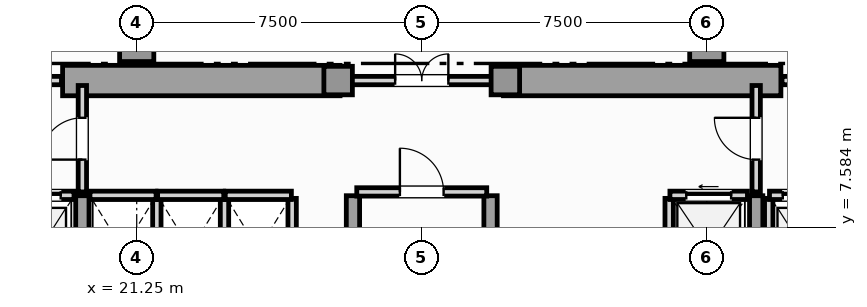
"""IFC4 building model, lengths in metres.
Left out: names, types, materials, properties, quantities, classifications, styles, units other than length and angle.
Written with IfcOpenShell. Run it as: python <this file> out.ifc"""

import sys

from ifc_helpers import new_model, si_unit, direction, frame, frame_2d, origin, origin_2d, place, context, subcontext, project, spatial, rectangle, extrude, element, fill, save


model = new_model("IFC4")
c1 = context("Model", 3, precision=1e-05, world=origin(), true_north=direction((0.0, 1.0)))
c2 = subcontext(c1, "Body", "Model", "MODEL_VIEW")
j1 = project(units=[si_unit("LENGTHUNIT", "METRE"), si_unit("PLANEANGLEUNIT", "RADIAN")], contexts=[c1])
p1 = place(None, origin())
s1 = spatial("IfcSite", under=j1, at=p1, CompositionType="ELEMENT")
p2 = place(p1, origin())
s2 = spatial("IfcBuilding", under=s1, at=p2, CompositionType="ELEMENT")
p3 = place(p2, frame((0.0, 0.0, 5.4)))
s3 = spatial("IfcBuildingStorey", under=s2, at=p3, CompositionType="ELEMENT", Elevation=5.4)
for number, where, z_axis, x_axis in (
    (1, (19.3, 11.45, 0.0), (0.0, 0.0, 1.0), (1.0, 0.0, 0.0)),
    (2, (30.9, 11.45, 0.0), (0.0, 0.0, 1.0), (1.0, 0.0, 0.0)),
):
    element("IfcWall", number, at=place(p3, frame(where, z_axis=z_axis, x_axis=x_axis)), inside=s3, PredefinedType="SHEAR", context=c2, shape_type="SweptSolid", body=[
        extrude(rectangle(XDim=7.3, YDim=0.8, at=frame_2d((3.65, 0.0))), origin(), (0.0, 0.0, 1.0), 4.5),
    ])
for number, where, z_axis, x_axis in (
    (3, (19.82, 0.92, 0.0), (0.0, 0.0, 1.0), (0.0, 1.0, 0.0)),
    (4, (26.94, 0.92, 0.0), (0.0, 0.0, 1.0), (0.0, 1.0, 0.0)),
    (5, (30.56, 0.92, 0.0), (0.0, 0.0, 1.0), (0.0, 1.0, 0.0)),
    (6, (37.55, 0.92, 0.0), (0.0, 0.0, 1.0), (0.0, 1.0, 0.0)),
):
    element("IfcWall", number, at=place(p3, frame(where, z_axis=z_axis, x_axis=x_axis)), inside=s3, PredefinedType="SHEAR", context=c2, shape_type="SweptSolid", body=[
        extrude(rectangle(XDim=7.5, YDim=0.35, at=frame_2d((3.75, 0.0))), origin(), (0.0, 0.0, 1.0), 4.5),
    ])
for number, where, z_axis, x_axis in (
    (7, (26.55, 11.45, 0.0), (0.0, 0.0, 1.0), (1.0, 0.0, 0.0)),
    (8, (30.95, 11.45, 0.0), (0.0, 0.0, 1.0), (1.0, 0.0, 0.0)),
):
    element("IfcColumn", number, at=place(p3, frame(where, z_axis=z_axis, x_axis=x_axis)), inside=s3, PredefinedType="COLUMN", context=c2, shape_type="SweptSolid", body=[
        extrude(rectangle(XDim=0.75, YDim=0.75, at=origin_2d()), origin(), (0.0, 0.0, 1.0), 4.8),
    ])
for number, where, z_axis, x_axis in (
    (9, (21.25, 12.4, 0.0), (0.0, 0.0, 1.0), (1.0, 0.0, 0.0)),
    (10, (36.25, 12.4, 0.0), (0.0, 0.0, 1.0), (1.0, 0.0, 0.0)),
):
    element("IfcColumn", number, at=place(p3, frame(where, z_axis=z_axis, x_axis=x_axis)), inside=s3, PredefinedType="COLUMN", context=c2, shape_type="SweptSolid", body=[
        extrude(rectangle(XDim=0.9, YDim=0.9, at=origin_2d()), origin(), (0.0, 0.0, 1.0), 4.8),
    ])
p4 = place(p3, frame((17.78, 8.43, 0.0), z_axis=(0.0, 0.0, 1.0), x_axis=(1.0, 0.0, 0.0)))
e11 = element("IfcWall", 11, at=p4, inside=s3, PredefinedType="SOLIDWALL", context=c2, shape_type="SweptSolid", body=[
    extrude(rectangle(XDim=1.82, YDim=0.22, at=frame_2d((0.91, 0.0))), origin(), (0.0, 0.0, 1.0), 4.5),
])
p5 = place(p4, frame((0.35, 0.0, 0.0)))
e12 = element("IfcOpeningElement", 12, at=p5, cuts=e11, PredefinedType="OPENING", context=c2, shape_type="SweptSolid", body=[
    extrude(rectangle(XDim=1.12, YDim=2.25, at=frame_2d((0.56, 1.125))), frame((0.0, 0.12, 0.0), z_axis=(0.0, -1.0, 0.0), x_axis=(1.0, 0.0, 0.0)), (0.0, 0.0, 1.0), 0.24),
])
p6 = place(p3, frame((37.88, 5.65, 0.0), z_axis=(0.0, 0.0, 1.0), x_axis=(0.0, 1.0, 0.0)))
e13 = element("IfcWall", 13, at=p6, inside=s3, PredefinedType="SOLIDWALL", context=c2, shape_type="SweptSolid", body=[
    extrude(rectangle(XDim=2.7, YDim=0.22, at=frame_2d((1.35, 0.0))), origin(), (0.0, 0.0, 1.0), 4.5),
])
p7 = place(p3, frame((37.9, 8.43, 0.0), z_axis=(0.0, 0.0, 1.0), x_axis=(1.0, 0.0, 0.0)))
e14 = element("IfcWall", 14, at=p7, inside=s3, PredefinedType="SOLIDWALL", context=c2, shape_type="SweptSolid", body=[
    extrude(rectangle(XDim=1.82, YDim=0.22, at=frame_2d((0.91, 0.0))), origin(), (0.0, 0.0, 1.0), 4.5),
])
p8 = place(p7, frame((0.35, 0.0, 0.0)))
e15 = element("IfcOpeningElement", 15, at=p8, cuts=e14, PredefinedType="OPENING", context=c2, shape_type="SweptSolid", body=[
    extrude(rectangle(XDim=1.12, YDim=2.25, at=frame_2d((0.56, 1.125))), frame((0.0, 0.12, 0.0), z_axis=(0.0, -1.0, 0.0), x_axis=(1.0, 0.0, 0.0)), (0.0, 0.0, 1.0), 0.24),
])
p9 = place(p3, frame((35.26, 5.65, 0.0), z_axis=(0.0, 0.0, 1.0), x_axis=(0.0, 1.0, 0.0)))
e16 = element("IfcWall", 16, at=p9, inside=s3, PredefinedType="SOLIDWALL", context=c2, shape_type="SweptSolid", body=[
    extrude(rectangle(XDim=2.7, YDim=0.22, at=frame_2d((1.35, 0.0))), origin(), (0.0, 0.0, 1.0), 4.5),
])
p10 = place(p3, frame((35.28, 8.43, 0.0), z_axis=(0.0, 0.0, 1.0), x_axis=(1.0, 0.0, 0.0)))
e17 = element("IfcWall", 17, at=p10, inside=s3, PredefinedType="SOLIDWALL", context=c2, shape_type="SweptSolid", body=[
    extrude(rectangle(XDim=2.04, YDim=0.22, at=frame_2d((1.02, 0.0))), origin(), (0.0, 0.0, 1.0), 4.5),
])
p11 = place(p10, frame((0.43, 0.0, 0.0)))
e18 = element("IfcOpeningElement", 18, at=p11, cuts=e17, PredefinedType="OPENING", context=c2, shape_type="SweptSolid", body=[
    extrude(rectangle(XDim=1.18, YDim=2.2, at=frame_2d((0.59, 1.1))), frame((0.0, 0.12, 0.0), z_axis=(0.0, -1.0, 0.0), x_axis=(1.0, 0.0, 0.0)), (0.0, 0.0, 1.0), 0.24),
])
p12 = place(p3, frame((21.78, 5.65, 0.0), z_axis=(0.0, 0.0, 1.0), x_axis=(0.0, 1.0, 0.0)))
e19 = element("IfcWall", 19, at=p12, inside=s3, PredefinedType="SOLIDWALL", context=c2, shape_type="SweptSolid", body=[
    extrude(rectangle(XDim=2.7, YDim=0.22, at=frame_2d((1.35, 0.0))), origin(), (0.0, 0.0, 1.0), 4.5),
])
p13 = place(p3, frame((20.02, 8.43, 0.0), z_axis=(0.0, 0.0, 1.0), x_axis=(1.0, 0.0, 0.0)))
e20 = element("IfcWall", 20, at=p13, inside=s3, PredefinedType="SOLIDWALL", context=c2, shape_type="SweptSolid", body=[
    extrude(rectangle(XDim=1.74, YDim=0.22, at=frame_2d((0.87, 0.0))), origin(), (0.0, 0.0, 1.0), 4.5),
])
p14 = place(p3, frame((23.56, 5.65, 0.0), z_axis=(0.0, 0.0, 1.0), x_axis=(0.0, 1.0, 0.0)))
e21 = element("IfcWall", 21, at=p14, inside=s3, PredefinedType="SOLIDWALL", context=c2, shape_type="SweptSolid", body=[
    extrude(rectangle(XDim=2.7, YDim=0.22, at=frame_2d((1.35, 0.0))), origin(), (0.0, 0.0, 1.0), 4.5),
])
p15 = place(p3, frame((21.8, 8.43, 0.0), z_axis=(0.0, 0.0, 1.0), x_axis=(1.0, 0.0, 0.0)))
e22 = element("IfcWall", 22, at=p15, inside=s3, PredefinedType="SOLIDWALL", context=c2, shape_type="SweptSolid", body=[
    extrude(rectangle(XDim=1.74, YDim=0.22, at=frame_2d((0.87, 0.0))), origin(), (0.0, 0.0, 1.0), 4.5),
])
p16 = place(p3, frame((25.34, 5.65, 0.0), z_axis=(0.0, 0.0, 1.0), x_axis=(0.0, 1.0, 0.0)))
e23 = element("IfcWall", 23, at=p16, inside=s3, PredefinedType="SOLIDWALL", context=c2, shape_type="SweptSolid", body=[
    extrude(rectangle(XDim=2.7, YDim=0.22, at=frame_2d((1.35, 0.0))), origin(), (0.0, 0.0, 1.0), 4.5),
])
p17 = place(p3, frame((23.58, 8.43, 0.0), z_axis=(0.0, 0.0, 1.0), x_axis=(1.0, 0.0, 0.0)))
e24 = element("IfcWall", 24, at=p17, inside=s3, PredefinedType="SOLIDWALL", context=c2, shape_type="SweptSolid", body=[
    extrude(rectangle(XDim=1.74, YDim=0.22, at=frame_2d((0.87, 0.0))), origin(), (0.0, 0.0, 1.0), 4.5),
])
p18 = place(p3, frame((27.04, 8.52, 0.0), z_axis=(0.0, 0.0, 1.0), x_axis=(1.0, 0.0, 0.0)))
e25 = element("IfcWall", 25, at=p18, inside=s3, PredefinedType="SOLIDWALL", context=c2, shape_type="SweptSolid", body=[
    extrude(rectangle(XDim=3.42, YDim=0.22, at=frame_2d((1.71, 0.0))), origin(), (0.0, 0.0, 1.0), 4.5),
])
p19 = place(p18, frame((1.135, 0.0, 0.0)))
e26 = element("IfcOpeningElement", 26, at=p19, cuts=e25, PredefinedType="OPENING", context=c2, shape_type="SweptSolid", body=[
    extrude(rectangle(XDim=1.15, YDim=2.2, at=frame_2d((0.575, 1.1))), frame((0.0, 0.12, 0.0), z_axis=(0.0, -1.0, 0.0), x_axis=(1.0, 0.0, 0.0)), (0.0, 0.0, 1.0), 0.24),
])
p20 = place(p3, frame((19.82, 8.52, 0.0), z_axis=(0.0, 0.0, 1.0), x_axis=(0.0, 1.0, 0.0)))
e27 = element("IfcWall", 27, at=p20, inside=s3, PredefinedType="SOLIDWALL", context=c2, shape_type="SweptSolid", body=[
    extrude(rectangle(XDim=2.8, YDim=0.22, at=frame_2d((1.4, 0.0))), origin(), (0.0, 0.0, 1.0), 3.956),
])
p21 = place(p20, frame((0.85, 0.0, 0.0)))
e28 = element("IfcOpeningElement", 28, at=p21, cuts=e27, PredefinedType="OPENING", context=c2, shape_type="SweptSolid", body=[
    extrude(rectangle(XDim=1.1, YDim=2.2, at=frame_2d((0.55, 1.1))), frame((0.0, 0.12, 0.0), z_axis=(0.0, -1.0, 0.0), x_axis=(1.0, 0.0, 0.0)), (0.0, 0.0, 1.0), 0.24),
])
p22 = place(p3, frame((37.55, 8.52, 0.0), z_axis=(0.0, 0.0, 1.0), x_axis=(0.0, 1.0, 0.0)))
e29 = element("IfcWall", 29, at=p22, inside=s3, PredefinedType="SOLIDWALL", context=c2, shape_type="SweptSolid", body=[
    extrude(rectangle(XDim=2.8, YDim=0.22, at=frame_2d((1.4, 0.0))), origin(), (0.0, 0.0, 1.0), 3.956),
])
p23 = place(p22, frame((0.85, 0.0, 0.0)))
e30 = element("IfcOpeningElement", 30, at=p23, cuts=e29, PredefinedType="OPENING", context=c2, shape_type="SweptSolid", body=[
    extrude(rectangle(XDim=1.1, YDim=2.2, at=frame_2d((0.55, 1.1))), frame((0.0, 0.12, 0.0), z_axis=(0.0, -1.0, 0.0), x_axis=(1.0, 0.0, 0.0)), (0.0, 0.0, 1.0), 0.24),
])
p24 = place(p3, frame((16.23, 11.45, 0.0), z_axis=(0.0, 0.0, 1.0), x_axis=(1.0, 0.0, 0.0)))
e31 = element("IfcWall", 31, at=p24, inside=s3, PredefinedType="SOLIDWALL", context=c2, shape_type="SweptSolid", body=[
    extrude(rectangle(XDim=3.04, YDim=0.22, at=frame_2d((1.52, 0.0))), origin(), (0.0, 0.0, 1.0), 4.5),
])
p25 = place(p24, frame((0.97, 0.0, 0.0)))
e32 = element("IfcOpeningElement", 32, at=p25, cuts=e31, PredefinedType="OPENING", context=c2, shape_type="SweptSolid", body=[
    extrude(rectangle(XDim=1.1, YDim=2.2, at=frame_2d((0.55, 1.1))), frame((0.0, 0.12, 0.0), z_axis=(0.0, -1.0, 0.0), x_axis=(1.0, 0.0, 0.0)), (0.0, 0.0, 1.0), 0.24),
])
p26 = place(p3, frame((26.63, 11.45, 0.0), z_axis=(0.0, 0.0, 1.0), x_axis=(1.0, 0.0, 0.0)))
e33 = element("IfcWall", 33, at=p26, inside=s3, PredefinedType="SOLIDWALL", context=c2, shape_type="SweptSolid", body=[
    extrude(rectangle(XDim=4.24, YDim=0.22, at=frame_2d((2.12, 0.0))), origin(), (0.0, 0.0, 1.0), 4.5),
])
p27 = place(p26, frame((1.42, 0.0, 0.0)))
e34 = element("IfcOpeningElement", 34, at=p27, cuts=e33, PredefinedType="OPENING", context=c2, shape_type="SweptSolid", body=[
    extrude(rectangle(XDim=1.4, YDim=2.2, at=frame_2d((0.7, 1.1))), frame((0.0, 0.12, 0.0), z_axis=(0.0, -1.0, 0.0), x_axis=(1.0, 0.0, 0.0)), (0.0, 0.0, 1.0), 0.24),
])
p28 = place(p3, frame((38.23, 11.45, 0.0), z_axis=(0.0, 0.0, 1.0), x_axis=(1.0, 0.0, 0.0)))
e35 = element("IfcWall", 35, at=p28, inside=s3, PredefinedType="SOLIDWALL", context=c2, shape_type="SweptSolid", body=[
    extrude(rectangle(XDim=3.04, YDim=0.22, at=frame_2d((1.52, 0.0))), origin(), (0.0, 0.0, 1.0), 4.5),
])
p29 = place(p28, frame((0.97, 0.0, 0.0)))
e36 = element("IfcOpeningElement", 36, at=p29, cuts=e35, PredefinedType="OPENING", context=c2, shape_type="SweptSolid", body=[
    extrude(rectangle(XDim=1.1, YDim=2.2, at=frame_2d((0.55, 1.1))), frame((0.0, 0.12, 0.0), z_axis=(0.0, -1.0, 0.0), x_axis=(1.0, 0.0, 0.0)), (0.0, 0.0, 1.0), 0.24),
])
p30 = place(p5, origin())
e37 = element("IfcDoor", 37, at=p30, inside=s3, OperationType="SLIDING_TO_LEFT", PredefinedType="DOOR", context=c2, shape_type="SweptSolid", body=[
    extrude(rectangle(XDim=1.12, YDim=2.25, at=frame_2d((0.56, 1.125))), frame((0.0, 0.025, 0.0), z_axis=(0.0, -1.0, 0.0), x_axis=(1.0, 0.0, 0.0)), (0.0, 0.0, 1.0), 0.05),
])
fill(e12, e37)
p31 = place(p8, origin())
e38 = element("IfcDoor", 38, at=p31, inside=s3, OperationType="SLIDING_TO_RIGHT", PredefinedType="DOOR", context=c2, shape_type="SweptSolid", body=[
    extrude(rectangle(XDim=1.12, YDim=2.25, at=frame_2d((0.56, 1.125))), frame((0.0, 0.025, 0.0), z_axis=(0.0, -1.0, 0.0), x_axis=(1.0, 0.0, 0.0)), (0.0, 0.0, 1.0), 0.05),
])
fill(e15, e38)
p32 = place(p11, origin())
e39 = element("IfcDoor", 39, at=p32, inside=s3, OperationType="SLIDING_TO_LEFT", PredefinedType="DOOR", context=c2, shape_type="SweptSolid", body=[
    extrude(rectangle(XDim=1.18, YDim=2.2, at=frame_2d((0.59, 1.1))), frame((0.0, 0.025, 0.0), z_axis=(0.0, -1.0, 0.0), x_axis=(1.0, 0.0, 0.0)), (0.0, 0.0, 1.0), 0.05),
])
fill(e18, e39)
p33 = place(p19, origin())
e40 = element("IfcDoor", 40, at=p33, inside=s3, OperationType="SINGLE_SWING_LEFT", PredefinedType="DOOR", context=c2, shape_type="SweptSolid", body=[
    extrude(rectangle(XDim=1.15, YDim=2.2, at=frame_2d((0.575, 1.1))), frame((0.0, 0.025, 0.0), z_axis=(0.0, -1.0, 0.0), x_axis=(1.0, 0.0, 0.0)), (0.0, 0.0, 1.0), 0.05),
])
fill(e26, e40)
p34 = place(p21, origin())
e41 = element("IfcDoor", 41, at=p34, inside=s3, OperationType="SINGLE_SWING_LEFT", PredefinedType="DOOR", context=c2, shape_type="SweptSolid", body=[
    extrude(rectangle(XDim=1.1, YDim=2.2, at=frame_2d((0.55, 1.1))), frame((0.0, 0.025, 0.0), z_axis=(0.0, -1.0, 0.0), x_axis=(1.0, 0.0, 0.0)), (0.0, 0.0, 1.0), 0.05),
])
fill(e28, e41)
p35 = place(p23, origin())
e42 = element("IfcDoor", 42, at=p35, inside=s3, OperationType="SINGLE_SWING_RIGHT", PredefinedType="DOOR", context=c2, shape_type="SweptSolid", body=[
    extrude(rectangle(XDim=1.1, YDim=2.2, at=frame_2d((0.55, 1.1))), frame((0.0, 0.025, 0.0), z_axis=(0.0, -1.0, 0.0), x_axis=(1.0, 0.0, 0.0)), (0.0, 0.0, 1.0), 0.05),
])
fill(e30, e42)
p36 = place(p27, origin())
e43 = element("IfcDoor", 43, at=p36, inside=s3, OperationType="DOUBLE_DOOR_SINGLE_SWING", PredefinedType="DOOR", context=c2, shape_type="SweptSolid", body=[
    extrude(rectangle(XDim=1.4, YDim=2.2, at=frame_2d((0.7, 1.1))), frame((0.0, 0.025, 0.0), z_axis=(0.0, -1.0, 0.0), x_axis=(1.0, 0.0, 0.0)), (0.0, 0.0, 1.0), 0.05),
])
fill(e34, e43)
save(model, sys.argv[1])
